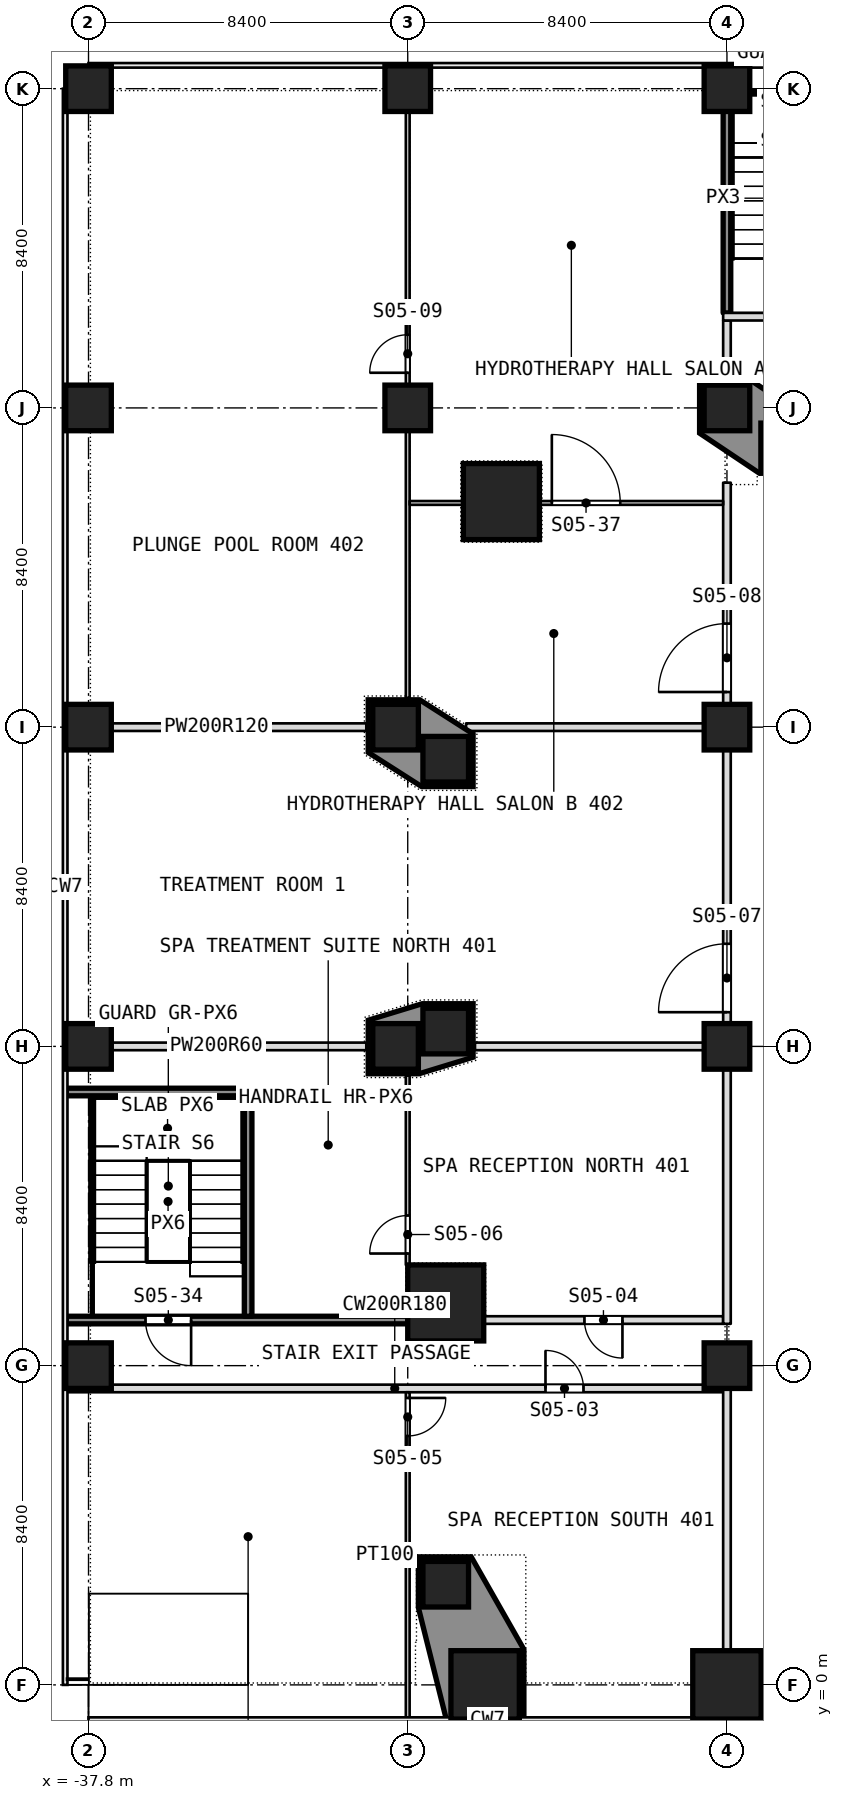
"""IFC4 building model, lengths in metres.
Left out: names, types, materials, properties, quantities, classifications, styles, units other than length and angle.
Written with IfcOpenShell. Run it as: python <this file> out.ifc"""

import sys

from ifc_helpers import new_model, si_unit, direction, frame, frame_2d, origin, origin_2d, place, context, subcontext, project, spatial, polyline, rectangle, outline, extrude, element, fill, save


model = new_model("IFC4")
c1 = context("Model", 3, precision=1e-05, world=origin(), true_north=direction((0.0, 1.0)))
c2 = subcontext(c1, "Body", "Model", "MODEL_VIEW")
j1 = project(units=[si_unit("LENGTHUNIT", "METRE"), si_unit("PLANEANGLEUNIT", "RADIAN")], contexts=[c1])
p1 = place(None, origin())
s1 = spatial("IfcSite", under=j1, at=p1, CompositionType="ELEMENT")
p2 = place(p1, origin())
s2 = spatial("IfcBuilding", under=s1, at=p2, CompositionType="ELEMENT")
p3 = place(p2, frame((0.0, 0.0, 26.0)))
s3 = spatial("IfcBuildingStorey", under=s2, at=p3, CompositionType="ELEMENT", Elevation=26.0)
p4 = place(p3, frame((-21.0, 0.0, 0.0), z_axis=(0.0, 0.0, 1.0), x_axis=(1.0, 0.0, 0.0)))
e1 = element("IfcColumn", 1, at=p4, inside=s3, PredefinedType="COLUMN", context=c2, shape_type="SweptSolid", body=[
    extrude(rectangle(XDim=1.8, YDim=1.8, at=origin_2d()), origin(), (0.0, 0.0, 1.0), 5.0),
])
for number, where, z_axis, x_axis in (
    (2, (-37.8, 8.4, 0.0), (0.0, 0.0, 1.0), (1.0, 0.0, 0.0)),
    (3, (-21.0, 8.4, 0.0), (0.0, 0.0, 1.0), (1.0, 0.0, 0.0)),
    (4, (-37.8, 16.8, 0.0), (0.0, 0.0, 1.0), (1.0, 0.0, 0.0)),
    (5, (-29.72, 16.8, 0.0), (0.0, 0.0, 1.0), (1.0, 0.0, 0.0)),
    (6, (-21.0, 16.8, 0.0), (0.0, 0.0, 1.0), (1.0, 0.0, 0.0)),
    (7, (-37.8, 25.2, 0.0), (0.0, 0.0, 1.0), (1.0, 0.0, 0.0)),
    (8, (-29.72, 25.2, 0.0), (0.0, 0.0, 1.0), (1.0, 0.0, 0.0)),
    (9, (-21.0, 25.2, 0.0), (0.0, 0.0, 1.0), (1.0, 0.0, 0.0)),
    (10, (-37.8, 33.6, 0.0), (0.0, 0.0, 1.0), (1.0, 0.0, 0.0)),
    (11, (-29.4, 33.6, 0.0), (0.0, 0.0, 1.0), (1.0, 0.0, 0.0)),
    (12, (-21.0, 33.6, 0.0), (0.0, 0.0, 1.0), (1.0, 0.0, 0.0)),
    (13, (-37.8, 42.0, 0.0), (0.0, 0.0, 1.0), (1.0, 0.0, 0.0)),
    (14, (-29.4, 42.0, 0.0), (0.0, 0.0, 1.0), (1.0, 0.0, 0.0)),
    (15, (-21.0, 42.0, 0.0), (0.0, 0.0, 1.0), (1.0, 0.0, 0.0)),
):
    element("IfcColumn", number, at=place(p3, frame(where, z_axis=z_axis, x_axis=x_axis)), inside=s3, PredefinedType="COLUMN", context=c2, shape_type="SweptSolid", body=[
        extrude(rectangle(XDim=1.2, YDim=1.2, at=origin_2d()), origin(), (0.0, 0.0, 1.0), 5.0),
    ])
p5 = place(p3, frame((-27.363, 0.0, 0.0), z_axis=(0.0, 0.0, 1.0), x_axis=(1.0, 0.0, 0.0)))
e16 = element("IfcColumn", 16, at=p5, inside=s3, PredefinedType="COLUMN", context=c2, shape_type="SweptSolid", body=[
    extrude(rectangle(XDim=1.8, YDim=1.8, at=origin_2d()), origin(), (0.0, 0.0, 1.0), 5.0),
])
for number, where, z_axis, x_axis in (
    (17, (-28.4, 10.05, 0.0), (0.0, 0.0, 1.0), (1.0, 0.0, 0.0)),
    (18, (-26.936, 31.135, 0.0), (0.0, 0.0, 1.0), (1.0, 0.0, 0.0)),
):
    element("IfcColumn", number, at=place(p3, frame(where, z_axis=z_axis, x_axis=x_axis)), inside=s3, PredefinedType="COLUMN", context=c2, shape_type="SweptSolid", body=[
        extrude(rectangle(XDim=2.0, YDim=2.0, at=origin_2d()), origin(), (0.0, 0.0, 1.0), 5.0),
    ])
p6 = place(p3, frame((-37.8, 2.4, 0.0), z_axis=(-1.0, 0.0, 0.0), x_axis=(0.0, -1.0, 0.0)))
e19 = element("IfcWall", 19, at=p6, inside=s3, PredefinedType="SOLIDWALL", context=c2, shape_type="SweptSolid", body=[
    extrude(outline(polyline([(0.0, 0.0), (5.279, 0.0), (6.0, 0.541), (7.2, 1.199), (8.4, 1.65), (9.6, 1.913), (10.8, 2.0), (12.0, 1.913), (13.2, 1.65), (14.4, 1.199), (15.6, 0.541), (16.321, 0.0), (21.6, 0.0), (21.6, 4.68), (0.0, 4.68), (0.0, 0.0)])), origin(), (0.0, 0.0, -1.0), 4.2),
])
for number, where, z_axis, x_axis in (
    (20, (-28.4, 2.649, 0.0), (0.0, 0.0, 1.0), (1.0, 0.0, 0.0)),
    (21, (-28.4, 17.203, 0.0), (0.0, 0.0, 1.0), (1.0, 0.0, 0.0)),
    (22, (-28.4, 24.356, 0.0), (0.0, 0.0, 1.0), (1.0, 0.0, 0.0)),
    (23, (-19.507, 32.6, 0.0), (0.0, 0.0, 1.0), (1.0, 0.0, 0.0)),
):
    element("IfcColumn", number, at=place(p3, frame(where, z_axis=z_axis, x_axis=x_axis)), inside=s3, PredefinedType="COLUMN", context=c2, shape_type="SweptSolid", body=[
        extrude(rectangle(XDim=1.2, YDim=1.2, at=origin_2d()), origin(), (0.0, 0.0, 1.0), 5.0),
    ])
p7 = place(p3, frame((-38.384, 7.8, 0.0), z_axis=(0.0, 0.0, 1.0), x_axis=(1.0, 0.0, 0.0)))
e24 = element("IfcWall", 24, at=p7, inside=s3, PredefinedType="PARTITIONING", context=c2, shape_type="SweptSolid", body=[
    extrude(rectangle(XDim=17.284, YDim=0.2, at=frame_2d((8.642, 0.0))), origin(), (0.0, 0.0, 1.0), 4.68),
])
p8 = place(p7, frame((12.609, 0.0, 0.0)))
e25 = element("IfcOpeningElement", 25, at=p8, cuts=e24, PredefinedType="OPENING", context=c2, shape_type="SweptSolid", body=[
    extrude(rectangle(XDim=1.0, YDim=2.1, at=frame_2d((0.5, 1.05))), frame((0.0, 0.1, 0.0), z_axis=(0.0, -1.0, 0.0), x_axis=(1.0, 0.0, 0.0)), (0.0, 0.0, 1.0), 0.2),
])
p9 = place(p3, frame((-38.384, 9.6, 0.0), z_axis=(0.0, 0.0, 1.0), x_axis=(1.0, 0.0, 0.0)))
e26 = element("IfcWall", 26, at=p9, inside=s3, PredefinedType="PARTITIONING", context=c2, shape_type="SweptSolid", body=[
    extrude(rectangle(XDim=8.984, YDim=0.2, at=frame_2d((4.492, 0.0))), origin(), (0.0, 0.0, 1.0), 4.68),
])
p10 = place(p9, frame((2.084, 0.0, 0.0)))
e27 = element("IfcOpeningElement", 27, at=p10, cuts=e26, PredefinedType="OPENING", context=c2, shape_type="SweptSolid", body=[
    extrude(rectangle(XDim=1.2, YDim=2.1, at=frame_2d((0.6, 1.05))), frame((0.0, 0.1, 0.0), z_axis=(0.0, -1.0, 0.0), x_axis=(1.0, 0.0, 0.0)), (0.0, 0.0, 1.0), 0.2),
])
p11 = place(p3, frame((-27.4, 9.6, 0.0), z_axis=(0.0, 0.0, 1.0), x_axis=(1.0, 0.0, 0.0)))
e28 = element("IfcWall", 28, at=p11, inside=s3, PredefinedType="PARTITIONING", context=c2, shape_type="SweptSolid", body=[
    extrude(rectangle(XDim=6.3, YDim=0.2, at=frame_2d((3.15, 0.0))), origin(), (0.0, 0.0, 1.0), 4.68),
])
p12 = place(p11, frame((2.65, 0.0, 0.0)))
e29 = element("IfcOpeningElement", 29, at=p12, cuts=e28, PredefinedType="OPENING", context=c2, shape_type="SweptSolid", body=[
    extrude(rectangle(XDim=1.0, YDim=2.1, at=frame_2d((0.5, 1.05))), frame((0.0, 0.1, 0.0), z_axis=(0.0, -1.0, 0.0), x_axis=(1.0, 0.0, 0.0)), (0.0, 0.0, 1.0), 0.2),
])
p13 = place(p3, frame((-38.384, 15.6, 0.0), z_axis=(0.0, 0.0, 1.0), x_axis=(1.0, 0.0, 0.0)))
e30 = element("IfcWall", 30, at=p13, inside=s3, PredefinedType="PARTITIONING", context=c2, shape_type="SweptSolid", body=[
    extrude(rectangle(XDim=4.884, YDim=0.2, at=frame_2d((2.442, 0.0))), origin(), (0.0, 0.0, 1.0), 4.68),
])
p14 = place(p3, frame((-38.384, 16.8, 0.0), z_axis=(0.0, 0.0, 1.0), x_axis=(1.0, 0.0, 0.0)))
e31 = element("IfcWall", 31, at=p14, inside=s3, PredefinedType="PARTITIONING", context=c2, shape_type="SweptSolid", body=[
    extrude(rectangle(XDim=7.894, YDim=0.2, at=frame_2d((3.947, 0.0))), origin(), (0.0, 0.0, 1.0), 4.68),
])
p15 = place(p3, frame((-27.63, 16.8, 0.0), z_axis=(0.0, 0.0, 1.0), x_axis=(1.0, 0.0, 0.0)))
e32 = element("IfcWall", 32, at=p15, inside=s3, PredefinedType="PARTITIONING", context=c2, shape_type="SweptSolid", body=[
    extrude(rectangle(XDim=6.53, YDim=0.2, at=frame_2d((3.265, 0.0))), origin(), (0.0, 0.0, 1.0), 4.68),
])
p16 = place(p3, frame((-21.0, -0.884, 0.0), z_axis=(0.0, 0.0, 1.0), x_axis=(0.0, 1.0, 0.0)))
e33 = element("IfcWall", 33, at=p16, inside=s3, PredefinedType="PARTITIONING", context=c2, shape_type="SweptSolid", body=[
    extrude(rectangle(XDim=8.784, YDim=0.2, at=frame_2d((4.392, 0.0))), origin(), (0.0, 0.0, 1.0), 4.68),
])
p17 = place(p3, frame((-21.0, 9.5, 0.0), z_axis=(0.0, 0.0, 1.0), x_axis=(0.0, 1.0, 0.0)))
e34 = element("IfcWall", 34, at=p17, inside=s3, PredefinedType="PARTITIONING", context=c2, shape_type="SweptSolid", body=[
    extrude(rectangle(XDim=22.133, YDim=0.2, at=frame_2d((11.066, 0.0))), origin(), (0.0, 0.0, 1.0), 4.68),
])
p18 = place(p17, frame((8.2, 0.0, 0.0)))
e35 = element("IfcOpeningElement", 35, at=p18, cuts=e34, PredefinedType="OPENING", context=c2, shape_type="SweptSolid", body=[
    extrude(rectangle(XDim=1.8, YDim=2.1, at=frame_2d((0.9, 1.05))), frame((0.0, 0.1, 0.0), z_axis=(0.0, -1.0, 0.0), x_axis=(1.0, 0.0, 0.0)), (0.0, 0.0, 1.0), 0.2),
])
p19 = place(p17, frame((16.625, 0.0, 0.0)))
e36 = element("IfcOpeningElement", 36, at=p19, cuts=e34, PredefinedType="OPENING", context=c2, shape_type="SweptSolid", body=[
    extrude(rectangle(XDim=1.8, YDim=2.1, at=frame_2d((0.9, 1.05))), frame((0.0, 0.1, 0.0), z_axis=(0.0, -1.0, 0.0), x_axis=(1.0, 0.0, 0.0)), (0.0, 0.0, 1.0), 0.2),
])
p20 = place(p3, frame((-21.0, 34.567, 0.0), z_axis=(0.0, 0.0, 1.0), x_axis=(0.0, 1.0, 0.0)))
e37 = element("IfcWall", 37, at=p20, inside=s3, PredefinedType="PARTITIONING", context=c2, shape_type="SweptSolid", body=[
    extrude(rectangle(XDim=1.333, YDim=0.2, at=frame_2d((0.667, 0.0))), origin(), (0.0, 0.0, 1.0), 4.68),
])
p21 = place(p3, frame((-21.0, 36.1, 0.0), z_axis=(0.0, 0.0, 1.0), x_axis=(0.0, 1.0, 0.0)))
e38 = element("IfcWall", 38, at=p21, inside=s3, PredefinedType="PARTITIONING", context=c2, shape_type="SweptSolid", body=[
    extrude(rectangle(XDim=6.484, YDim=0.2, at=frame_2d((3.242, 0.0))), origin(), (0.0, 0.0, 1.0), 4.68),
])
p22 = place(p3, frame((-38.384, 25.2, 0.0), z_axis=(0.0, 0.0, 1.0), x_axis=(1.0, 0.0, 0.0)))
e39 = element("IfcWall", 39, at=p22, inside=s3, PredefinedType="PARTITIONING", context=c2, shape_type="SweptSolid", body=[
    extrude(rectangle(XDim=7.894, YDim=0.2, at=frame_2d((3.947, 0.0))), origin(), (0.0, 0.0, 1.0), 4.68),
])
p23 = place(p3, frame((-27.865, 25.2, 0.0), z_axis=(0.0, 0.0, 1.0), x_axis=(1.0, 0.0, 0.0)))
e40 = element("IfcWall", 40, at=p23, inside=s3, PredefinedType="PARTITIONING", context=c2, shape_type="SweptSolid", body=[
    extrude(rectangle(XDim=6.765, YDim=0.2, at=frame_2d((3.382, 0.0))), origin(), (0.0, 0.0, 1.0), 4.68),
])
p24 = place(p3, frame((-29.4, -0.884, 0.0), z_axis=(0.0, 0.0, 1.0), x_axis=(0.0, 1.0, 0.0)))
e41 = element("IfcWall", 41, at=p24, inside=s3, PredefinedType="PARTITIONING", context=c2, shape_type="SweptSolid", body=[
    extrude(rectangle(XDim=8.584, YDim=0.1, at=frame_2d((4.292, 0.0))), origin(), (0.0, 0.0, 1.0), 4.68),
])
p25 = place(p24, frame((7.434, 0.0, 0.0)))
e42 = element("IfcOpeningElement", 42, at=p25, cuts=e41, PredefinedType="OPENING", context=c2, shape_type="SweptSolid", body=[
    extrude(rectangle(XDim=1.0, YDim=2.1, at=frame_2d((0.5, 1.05))), frame((0.0, 0.05, 0.0), z_axis=(0.0, -1.0, 0.0), x_axis=(1.0, 0.0, 0.0)), (0.0, 0.0, 1.0), 0.1),
])
p26 = place(p3, frame((-29.4, 11.05, 0.0), z_axis=(0.0, 0.0, 1.0), x_axis=(0.0, 1.0, 0.0)))
e43 = element("IfcWall", 43, at=p26, inside=s3, PredefinedType="PARTITIONING", context=c2, shape_type="SweptSolid", body=[
    extrude(rectangle(XDim=4.98, YDim=0.1, at=frame_2d((2.49, 0.0))), origin(), (0.0, 0.0, 1.0), 4.68),
])
p27 = place(p26, frame((0.3, 0.0, 0.0)))
e44 = element("IfcOpeningElement", 44, at=p27, cuts=e43, PredefinedType="OPENING", context=c2, shape_type="SweptSolid", body=[
    extrude(rectangle(XDim=1.0, YDim=2.1, at=frame_2d((0.5, 1.05))), frame((0.0, 0.05, 0.0), z_axis=(0.0, -1.0, 0.0), x_axis=(1.0, 0.0, 0.0)), (0.0, 0.0, 1.0), 0.1),
])
p28 = place(p3, frame((-29.4, 25.97, 0.0), z_axis=(0.0, 0.0, 1.0), x_axis=(0.0, 1.0, 0.0)))
e45 = element("IfcWall", 45, at=p28, inside=s3, PredefinedType="PARTITIONING", context=c2, shape_type="SweptSolid", body=[
    extrude(rectangle(XDim=16.614, YDim=0.1, at=frame_2d((8.307, 0.0))), origin(), (0.0, 0.0, 1.0), 4.68),
])
p29 = place(p28, frame((8.555, 0.0, 0.0)))
e46 = element("IfcOpeningElement", 46, at=p29, cuts=e45, PredefinedType="OPENING", context=c2, shape_type="SweptSolid", body=[
    extrude(rectangle(XDim=1.0, YDim=2.1, at=frame_2d((0.5, 1.05))), frame((0.0, 0.05, 0.0), z_axis=(0.0, -1.0, 0.0), x_axis=(1.0, 0.0, 0.0)), (0.0, 0.0, 1.0), 0.1),
])
p30 = place(p3, frame((-29.35, 31.1, 0.0), z_axis=(0.0, 0.0, 1.0), x_axis=(1.0, 0.0, 0.0)))
e47 = element("IfcWall", 47, at=p30, inside=s3, PredefinedType="PARTITIONING", context=c2, shape_type="SweptSolid", body=[
    extrude(rectangle(XDim=1.394, YDim=0.1, at=frame_2d((0.697, 0.0))), origin(), (0.0, 0.0, 1.0), 4.68),
])
p31 = place(p3, frame((-25.916, 31.1, 0.0), z_axis=(0.0, 0.0, 1.0), x_axis=(1.0, 0.0, 0.0)))
e48 = element("IfcWall", 48, at=p31, inside=s3, PredefinedType="PARTITIONING", context=c2, shape_type="SweptSolid", body=[
    extrude(rectangle(XDim=4.816, YDim=0.1, at=frame_2d((2.408, 0.0))), origin(), (0.0, 0.0, 1.0), 4.68),
])
p32 = place(p31, frame((0.308, 0.0, 0.0)))
e49 = element("IfcOpeningElement", 49, at=p32, cuts=e48, PredefinedType="OPENING", context=c2, shape_type="SweptSolid", body=[
    extrude(rectangle(XDim=1.8, YDim=2.1, at=frame_2d((0.9, 1.05))), frame((0.0, 0.05, 0.0), z_axis=(0.0, -1.0, 0.0), x_axis=(1.0, 0.0, 0.0)), (0.0, 0.0, 1.0), 0.1),
])
p33 = place(p3, frame((-33.6, 9.7, 0.0), z_axis=(0.0, 0.0, 1.0), x_axis=(0.0, 1.0, 0.0)))
e50 = element("IfcWall", 50, at=p33, inside=s3, PredefinedType="PARTITIONING", context=c2, shape_type="SweptSolid", body=[
    extrude(rectangle(XDim=5.8, YDim=0.2, at=frame_2d((2.9, 0.0))), origin(), (0.0, 0.0, 1.0), 4.68),
])
p34 = place(p3, frame((-21.1, 36.0, 0.0), z_axis=(0.0, 0.0, 1.0), x_axis=(1.0, 0.0, 0.0)))
e51 = element("IfcWall", 51, at=p34, inside=s3, PredefinedType="PARTITIONING", context=c2, shape_type="SweptSolid", body=[
    extrude(rectangle(XDim=23.3, YDim=0.2, at=frame_2d((11.65, 0.0))), origin(), (0.0, 0.0, 1.0), 4.68),
])
p35 = place(p34, frame((1.6, 0.0, 0.0)))
e52 = element("IfcOpeningElement", 52, at=p35, cuts=e51, PredefinedType="OPENING", context=c2, shape_type="SweptSolid", body=[
    extrude(rectangle(XDim=1.2, YDim=2.1, at=frame_2d((0.6, 1.05))), frame((0.0, 0.1, 0.0), z_axis=(0.0, -1.0, 0.0), x_axis=(1.0, 0.0, 0.0)), (0.0, 0.0, 1.0), 0.2),
])
p36 = place(p34, frame((11.15, 0.0, 0.0)))
e53 = element("IfcOpeningElement", 53, at=p36, cuts=e51, PredefinedType="OPENING", context=c2, shape_type="SweptSolid", body=[
    extrude(rectangle(XDim=1.0, YDim=2.1, at=frame_2d((0.5, 1.05))), frame((0.0, 0.1, 0.0), z_axis=(0.0, -1.0, 0.0), x_axis=(1.0, 0.0, 0.0)), (0.0, 0.0, 1.0), 0.2),
])
p37 = place(p34, frame((10.05, 0.0, 0.0)))
e54 = element("IfcOpeningElement", 54, at=p37, cuts=e51, PredefinedType="OPENING", context=c2, shape_type="SweptSolid", body=[
    extrude(rectangle(XDim=1.0, YDim=2.1, at=frame_2d((0.5, 1.05))), frame((0.0, 0.1, 0.0), z_axis=(0.0, -1.0, 0.0), x_axis=(1.0, 0.0, 0.0)), (0.0, 0.0, 1.0), 0.2),
])
p38 = place(p34, frame((20.5, 0.0, 0.0)))
e55 = element("IfcOpeningElement", 55, at=p38, cuts=e51, PredefinedType="OPENING", context=c2, shape_type="SweptSolid", body=[
    extrude(rectangle(XDim=1.2, YDim=2.1, at=frame_2d((0.6, 1.05))), frame((0.0, 0.1, 0.0), z_axis=(0.0, -1.0, 0.0), x_axis=(1.0, 0.0, 0.0)), (0.0, 0.0, 1.0), 0.2),
])
p39 = place(p3, origin())
e56 = element("IfcWall", 56, at=p39, inside=s3, PredefinedType="SOLIDWALL", context=c2, shape_type="SweptSolid", body=[
    extrude(outline(polyline([(-29.12, 2.034), (-29.12, 3.369), (-27.73, 3.369), (-26.343, 0.932), (-26.343, -1.02), (-28.357, -1.02), (-29.12, 2.034)]), holes=[polyline([(-28.263, -0.9), (-26.463, -0.9), (-26.463, 0.9), (-28.263, 0.9), (-28.263, -0.9)]), polyline([(-29.0, 2.049), (-27.8, 2.049), (-27.8, 3.249), (-29.0, 3.249), (-29.0, 2.049)])]), origin(), (0.0, 0.0, 1.0), 5.0),
])
p40 = place(p3, origin())
e57 = element("IfcWall", 57, at=p40, inside=s3, PredefinedType="SOLIDWALL", context=c2, shape_type="SweptSolid", body=[
    extrude(outline(polyline([(-30.44, 17.489), (-29.018, 17.923), (-27.68, 17.923), (-27.68, 16.514), (-29.102, 16.08), (-30.44, 16.08), (-30.44, 17.489)]), holes=[polyline([(-29.0, 16.603), (-27.8, 16.603), (-27.8, 17.803), (-29.0, 17.803), (-29.0, 16.603)]), polyline([(-30.32, 16.2), (-29.12, 16.2), (-29.12, 17.4), (-30.32, 17.4), (-30.32, 16.2)])]), origin(), (0.0, 0.0, 1.0), 5.0),
])
p41 = place(p3, origin())
e58 = element("IfcWall", 58, at=p41, inside=s3, PredefinedType="SOLIDWALL", context=c2, shape_type="SweptSolid", body=[
    extrude(outline(polyline([(-30.44, 24.534), (-30.44, 25.92), (-29.085, 25.92), (-27.68, 25.022), (-27.68, 23.636), (-29.035, 23.636), (-30.44, 24.534)]), holes=[polyline([(-29.0, 23.756), (-27.8, 23.756), (-27.8, 24.956), (-29.0, 24.956), (-29.0, 23.756)]), polyline([(-30.32, 24.6), (-29.12, 24.6), (-29.12, 25.8), (-30.32, 25.8), (-30.32, 24.6)])]), origin(), (0.0, 0.0, 1.0), 5.0),
])
p42 = place(p3, origin())
e59 = element("IfcWall", 59, at=p42, inside=s3, PredefinedType="SOLIDWALL", context=c2, shape_type="SweptSolid", body=[
    extrude(outline(polyline([(-21.72, 34.32), (-20.364, 34.32), (-18.787, 33.264), (-18.787, 31.88), (-20.143, 31.88), (-21.72, 32.936), (-21.72, 34.32)]), holes=[polyline([(-18.907, 32.0), (-18.907, 33.2), (-20.107, 33.2), (-20.107, 32.0), (-18.907, 32.0)]), polyline([(-20.4, 33.0), (-20.4, 34.2), (-21.6, 34.2), (-21.6, 33.0), (-20.4, 33.0)])]), origin(), (0.0, 0.0, 1.0), 5.0),
])
p43 = place(p8, origin())
e60 = element("IfcDoor", 60, at=p43, inside=s3, OperationType="SINGLE_SWING_RIGHT", PredefinedType="DOOR", context=c2, shape_type="SweptSolid", body=[
    extrude(rectangle(XDim=1.0, YDim=2.1, at=frame_2d((0.5, 1.05))), frame((0.0, 0.025, 0.0), z_axis=(0.0, -1.0, 0.0), x_axis=(1.0, 0.0, 0.0)), (0.0, 0.0, 1.0), 0.05),
])
fill(e25, e60)
p44 = place(p12, origin())
e61 = element("IfcDoor", 61, at=p44, inside=s3, OperationType="SINGLE_SWING_RIGHT", PredefinedType="DOOR", context=c2, shape_type="SweptSolid", body=[
    extrude(rectangle(XDim=1.0, YDim=2.1, at=frame_2d((0.5, 1.05))), frame((0.0, 0.025, 0.0), z_axis=(0.0, -1.0, 0.0), x_axis=(1.0, 0.0, 0.0)), (0.0, 0.0, 1.0), 0.05),
])
fill(e29, e61)
p45 = place(p25, origin())
e62 = element("IfcDoor", 62, at=p45, inside=s3, OperationType="SINGLE_SWING_RIGHT", PredefinedType="DOOR", context=c2, shape_type="SweptSolid", body=[
    extrude(rectangle(XDim=1.0, YDim=2.1, at=frame_2d((0.5, 1.05))), frame((0.0, 0.025, 0.0), z_axis=(0.0, -1.0, 0.0), x_axis=(1.0, 0.0, 0.0)), (0.0, 0.0, 1.0), 0.05),
])
fill(e42, e62)
p46 = place(p27, origin())
e63 = element("IfcDoor", 63, at=p46, inside=s3, OperationType="SINGLE_SWING_LEFT", PredefinedType="DOOR", context=c2, shape_type="SweptSolid", body=[
    extrude(rectangle(XDim=1.0, YDim=2.1, at=frame_2d((0.5, 1.05))), frame((0.0, 0.025, 0.0), z_axis=(0.0, -1.0, 0.0), x_axis=(1.0, 0.0, 0.0)), (0.0, 0.0, 1.0), 0.05),
])
fill(e44, e63)
p47 = place(p18, origin())
e64 = element("IfcDoor", 64, at=p47, inside=s3, OperationType="DOUBLE_DOOR_SINGLE_SWING", PredefinedType="DOOR", context=c2, shape_type="SweptSolid", body=[
    extrude(rectangle(XDim=1.8, YDim=2.1, at=frame_2d((0.9, 1.05))), frame((0.0, 0.025, 0.0), z_axis=(0.0, -1.0, 0.0), x_axis=(1.0, 0.0, 0.0)), (0.0, 0.0, 1.0), 0.05),
])
fill(e35, e64)
p48 = place(p19, origin())
e65 = element("IfcDoor", 65, at=p48, inside=s3, OperationType="DOUBLE_DOOR_SINGLE_SWING", PredefinedType="DOOR", context=c2, shape_type="SweptSolid", body=[
    extrude(rectangle(XDim=1.8, YDim=2.1, at=frame_2d((0.9, 1.05))), frame((0.0, 0.025, 0.0), z_axis=(0.0, -1.0, 0.0), x_axis=(1.0, 0.0, 0.0)), (0.0, 0.0, 1.0), 0.05),
])
fill(e36, e65)
p49 = place(p29, origin())
e66 = element("IfcDoor", 66, at=p49, inside=s3, OperationType="SINGLE_SWING_LEFT", PredefinedType="DOOR", context=c2, shape_type="SweptSolid", body=[
    extrude(rectangle(XDim=1.0, YDim=2.1, at=frame_2d((0.5, 1.05))), frame((0.0, 0.025, 0.0), z_axis=(0.0, -1.0, 0.0), x_axis=(1.0, 0.0, 0.0)), (0.0, 0.0, 1.0), 0.05),
])
fill(e46, e66)
p50 = place(p10, origin())
e67 = element("IfcDoor", 67, at=p50, inside=s3, OperationType="SINGLE_SWING_RIGHT", PredefinedType="DOOR", context=c2, shape_type="SweptSolid", body=[
    extrude(rectangle(XDim=1.2, YDim=2.1, at=frame_2d((0.6, 1.05))), frame((0.0, 0.025, 0.0), z_axis=(0.0, -1.0, 0.0), x_axis=(1.0, 0.0, 0.0)), (0.0, 0.0, 1.0), 0.05),
])
fill(e27, e67)
p51 = place(p32, origin())
e68 = element("IfcDoor", 68, at=p51, inside=s3, OperationType="DOUBLE_DOOR_SINGLE_SWING", PredefinedType="DOOR", context=c2, shape_type="SweptSolid", body=[
    extrude(rectangle(XDim=1.8, YDim=2.1, at=frame_2d((0.9, 1.05))), frame((0.0, 0.025, 0.0), z_axis=(0.0, -1.0, 0.0), x_axis=(1.0, 0.0, 0.0)), (0.0, 0.0, 1.0), 0.05),
])
fill(e49, e68)
save(model, sys.argv[1])
